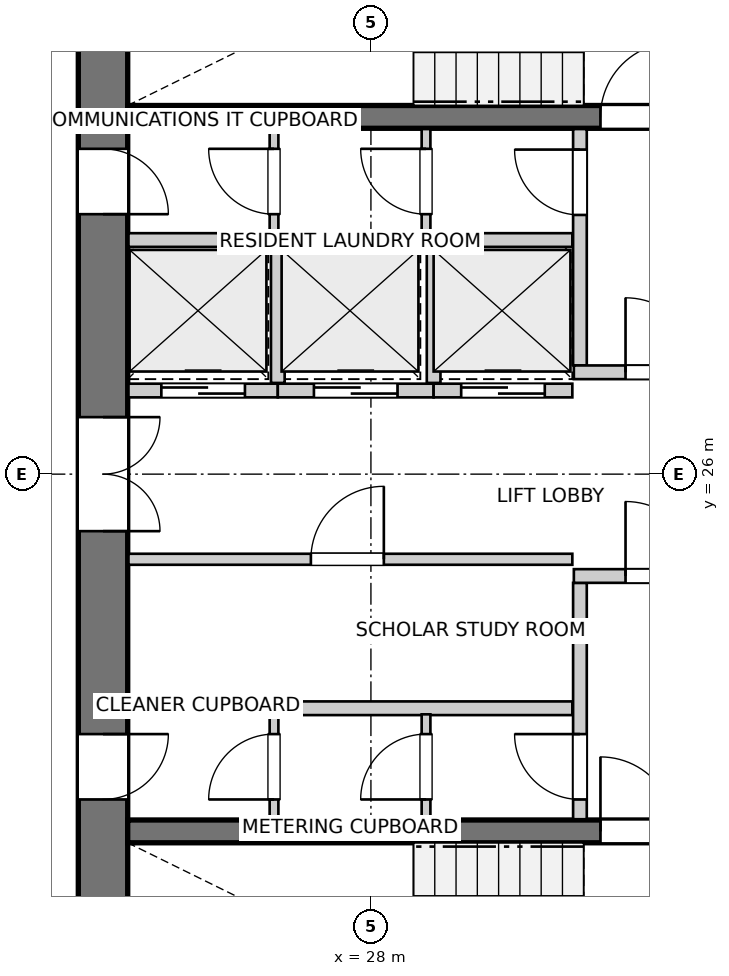
"""IFC4 building model, lengths in metres.
Left out: names, types, materials, properties, quantities, classifications, styles, units other than length and angle.
Written with IfcOpenShell. Run it as: python <this file> out.ifc"""

import sys

from ifc_helpers import new_model, si_unit, direction, frame, frame_2d, origin, place, context, subcontext, project, spatial, rectangle, extrude, source, transform, mapped, element, fill, save


model = new_model("IFC4")
c1 = context("Model", 3, precision=1e-05, world=origin(), true_north=direction((0.0, 1.0)))
c2 = subcontext(c1, "Body", "Model", "MODEL_VIEW")
j1 = project(units=[si_unit("LENGTHUNIT", "METRE"), si_unit("PLANEANGLEUNIT", "RADIAN")], contexts=[c1])
p1 = place(None, origin())
s1 = spatial("IfcSite", under=j1, at=p1, CompositionType="ELEMENT")
p2 = place(p1, origin())
s2 = spatial("IfcBuilding", under=s1, at=p2, CompositionType="ELEMENT")
p3 = place(p2, frame((0.0, 0.0, 158.6)))
s3 = spatial("IfcBuildingStorey", under=s2, at=p3, CompositionType="ELEMENT", Elevation=158.6)
p4 = place(p3, frame((24.475, 33.8, 0.0), z_axis=(0.0, 0.0, 1.0), x_axis=(0.0, -1.0, 0.0)))
e1 = element("IfcWall", 1, at=p4, inside=s3, PredefinedType="SHEAR", context=c2, shape_type="SweptSolid", body=[
    extrude(rectangle(XDim=15.6, YDim=0.65, at=frame_2d((7.8, 0.0))), origin(), (0.0, 0.0, 1.0), 2.95),
])
p5 = place(p4, frame((7.05, 0.0, 0.0)))
e2 = element("IfcOpeningElement", 2, at=p5, cuts=e1, PredefinedType="OPENING", context=c2, shape_type="SweptSolid", body=[
    extrude(rectangle(XDim=1.5, YDim=2.15, at=frame_2d((0.75, 1.075))), frame((0.0, 0.335, 0.0), z_axis=(0.0, -1.0, 0.0), x_axis=(1.0, 0.0, 0.0)), (0.0, 0.0, 1.0), 0.67),
])
p6 = place(p4, frame((3.52, 0.0, 0.0)))
e3 = element("IfcOpeningElement", 3, at=p6, cuts=e1, PredefinedType="OPENING", context=c2, shape_type="SweptSolid", body=[
    extrude(rectangle(XDim=0.86, YDim=2.05, at=frame_2d((0.43, 1.025))), frame((0.0, 0.335, 0.0), z_axis=(0.0, -1.0, 0.0), x_axis=(1.0, 0.0, 0.0)), (0.0, 0.0, 1.0), 0.67),
])
p7 = place(p4, frame((11.22, 0.0, 0.0)))
e4 = element("IfcOpeningElement", 4, at=p7, cuts=e1, PredefinedType="OPENING", context=c2, shape_type="SweptSolid", body=[
    extrude(rectangle(XDim=0.86, YDim=2.05, at=frame_2d((0.43, 1.025))), frame((0.0, 0.335, 0.0), z_axis=(0.0, -1.0, 0.0), x_axis=(1.0, 0.0, 0.0)), (0.0, 0.0, 1.0), 0.67),
])
p8 = place(p3, frame((24.8, 21.3, 0.0), z_axis=(0.0, 0.0, 1.0), x_axis=(1.0, 0.0, 0.0)))
e5 = element("IfcWall", 5, at=p8, inside=s3, PredefinedType="SHEAR", context=c2, shape_type="SweptSolid", body=[
    extrude(rectangle(XDim=11.1, YDim=0.3, at=frame_2d((5.55, 0.0))), origin(), (0.0, 0.0, 1.0), 2.95),
])
p9 = place(p8, frame((6.22, 0.0, 0.0)))
e6 = element("IfcOpeningElement", 6, at=p9, cuts=e5, PredefinedType="OPENING", context=c2, shape_type="SweptSolid", body=[
    extrude(rectangle(XDim=0.98, YDim=2.15, at=frame_2d((0.49, 1.075))), frame((0.0, 0.16, 0.0), z_axis=(0.0, -1.0, 0.0), x_axis=(1.0, 0.0, 0.0)), (0.0, 0.0, 1.0), 0.32),
])
p10 = place(p8, frame((9.15, 0.0, 0.0)))
e7 = element("IfcOpeningElement", 7, at=p10, cuts=e5, PredefinedType="OPENING", context=c2, shape_type="SweptSolid", body=[
    extrude(rectangle(XDim=1.15, YDim=2.15, at=frame_2d((0.575, 1.075))), frame((0.0, 0.16, 0.0), z_axis=(0.0, -1.0, 0.0), x_axis=(1.0, 0.0, 0.0)), (0.0, 0.0, 1.0), 0.32),
])
p11 = place(p3, frame((24.8, 30.7, 0.0), z_axis=(0.0, 0.0, 1.0), x_axis=(1.0, 0.0, 0.0)))
e8 = element("IfcWall", 8, at=p11, inside=s3, PredefinedType="SHEAR", context=c2, shape_type="SweptSolid", body=[
    extrude(rectangle(XDim=11.1, YDim=0.3, at=frame_2d((5.55, 0.0))), origin(), (0.0, 0.0, 1.0), 2.95),
])
p12 = place(p11, frame((6.22, 0.0, 0.0)))
e9 = element("IfcOpeningElement", 9, at=p12, cuts=e8, PredefinedType="OPENING", context=c2, shape_type="SweptSolid", body=[
    extrude(rectangle(XDim=0.98, YDim=2.15, at=frame_2d((0.49, 1.075))), frame((0.0, 0.16, 0.0), z_axis=(0.0, -1.0, 0.0), x_axis=(1.0, 0.0, 0.0)), (0.0, 0.0, 1.0), 0.32),
])
p13 = place(p11, frame((9.15, 0.0, 0.0)))
e10 = element("IfcOpeningElement", 10, at=p13, cuts=e8, PredefinedType="OPENING", context=c2, shape_type="SweptSolid", body=[
    extrude(rectangle(XDim=1.15, YDim=2.15, at=frame_2d((0.575, 1.075))), frame((0.0, 0.16, 0.0), z_axis=(0.0, -1.0, 0.0), x_axis=(1.0, 0.0, 0.0)), (0.0, 0.0, 1.0), 0.32),
])
p14 = place(p3, frame((30.75, 21.46, 0.0), z_axis=(0.0, 0.0, 1.0), x_axis=(0.0, 1.0, 0.0)))
e11 = element("IfcWall", 11, at=p14, inside=s3, PredefinedType="PARTITIONING", context=c2, shape_type="SweptSolid", body=[
    extrude(rectangle(XDim=3.11, YDim=0.18, at=frame_2d((1.555, 0.0))), origin(), (0.0, 0.0, 1.0), 2.95),
])
p15 = place(p14, frame((0.26, 0.0, 0.0)))
e12 = element("IfcOpeningElement", 12, at=p15, cuts=e11, PredefinedType="OPENING", context=c2, shape_type="SweptSolid", body=[
    extrude(rectangle(XDim=0.86, YDim=2.05, at=frame_2d((0.43, 1.025))), frame((0.0, 0.1, 0.0), z_axis=(0.0, -1.0, 0.0), x_axis=(1.0, 0.0, 0.0)), (0.0, 0.0, 1.0), 0.2),
])
p16 = place(p3, frame((30.67, 24.66, 0.0), z_axis=(0.0, 0.0, 1.0), x_axis=(1.0, 0.0, 0.0)))
e13 = element("IfcWall", 13, at=p16, inside=s3, PredefinedType="PARTITIONING", context=c2, shape_type="SweptSolid", body=[
    extrude(rectangle(XDim=5.22, YDim=0.18, at=frame_2d((2.61, 0.0))), origin(), (0.0, 0.0, 1.0), 2.95),
])
p17 = place(p16, frame((0.68, 0.0, 0.0)))
e14 = element("IfcOpeningElement", 14, at=p17, cuts=e13, PredefinedType="OPENING", context=c2, shape_type="SweptSolid", body=[
    extrude(rectangle(XDim=0.98, YDim=2.15, at=frame_2d((0.49, 1.075))), frame((0.0, 0.1, 0.0), z_axis=(0.0, -1.0, 0.0), x_axis=(1.0, 0.0, 0.0)), (0.0, 0.0, 1.0), 0.2),
])
p18 = place(p3, frame((30.75, 27.43, 0.0), z_axis=(0.0, 0.0, 1.0), x_axis=(0.0, 1.0, 0.0)))
e15 = element("IfcWall", 15, at=p18, inside=s3, PredefinedType="PARTITIONING", context=c2, shape_type="SweptSolid", body=[
    extrude(rectangle(XDim=3.11, YDim=0.18, at=frame_2d((1.555, 0.0))), origin(), (0.0, 0.0, 1.0), 2.95),
])
p19 = place(p18, frame((1.98, 0.0, 0.0)))
e16 = element("IfcOpeningElement", 16, at=p19, cuts=e15, PredefinedType="OPENING", context=c2, shape_type="SweptSolid", body=[
    extrude(rectangle(XDim=0.86, YDim=2.05, at=frame_2d((0.43, 1.025))), frame((0.0, 0.1, 0.0), z_axis=(0.0, -1.0, 0.0), x_axis=(1.0, 0.0, 0.0)), (0.0, 0.0, 1.0), 0.2),
])
p20 = place(p3, frame((30.67, 27.34, 0.0), z_axis=(0.0, 0.0, 1.0), x_axis=(1.0, 0.0, 0.0)))
e17 = element("IfcWall", 17, at=p20, inside=s3, PredefinedType="PARTITIONING", context=c2, shape_type="SweptSolid", body=[
    extrude(rectangle(XDim=5.22, YDim=0.18, at=frame_2d((2.61, 0.0))), origin(), (0.0, 0.0, 1.0), 2.95),
])
p21 = place(p20, frame((0.68, 0.0, 0.0)))
e18 = element("IfcOpeningElement", 18, at=p21, cuts=e17, PredefinedType="OPENING", context=c2, shape_type="SweptSolid", body=[
    extrude(rectangle(XDim=0.98, YDim=2.15, at=frame_2d((0.49, 1.075))), frame((0.0, 0.1, 0.0), z_axis=(0.0, -1.0, 0.0), x_axis=(1.0, 0.0, 0.0)), (0.0, 0.0, 1.0), 0.2),
])
p22 = place(p3, frame((24.81, 22.92, 0.0), z_axis=(0.0, 0.0, 1.0), x_axis=(1.0, 0.0, 0.0)))
e19 = element("IfcWall", 19, at=p22, inside=s3, PredefinedType="PARTITIONING", context=c2, shape_type="SweptSolid", body=[
    extrude(rectangle(XDim=5.84, YDim=0.18, at=frame_2d((2.92, 0.0))), origin(), (0.0, 0.0, 1.0), 2.95),
])
p23 = place(p3, frame((24.81, 24.88, 0.0), z_axis=(0.0, 0.0, 1.0), x_axis=(1.0, 0.0, 0.0)))
e20 = element("IfcWall", 20, at=p23, inside=s3, PredefinedType="PARTITIONING", context=c2, shape_type="SweptSolid", body=[
    extrude(rectangle(XDim=5.84, YDim=0.145, at=frame_2d((2.92, 0.0))), origin(), (0.0, 0.0, 1.0), 2.95),
])
p24 = place(p23, frame((2.4, 0.0, 0.0)))
e21 = element("IfcOpeningElement", 21, at=p24, cuts=e20, PredefinedType="OPENING", context=c2, shape_type="SweptSolid", body=[
    extrude(rectangle(XDim=0.96, YDim=2.1, at=frame_2d((0.48, 1.05))), frame((0.0, 0.083, 0.0), z_axis=(0.0, -1.0, 0.0), x_axis=(1.0, 0.0, 0.0)), (0.0, 0.0, 1.0), 0.165),
])
p25 = place(p3, frame((24.81, 29.08, 0.0), z_axis=(0.0, 0.0, 1.0), x_axis=(1.0, 0.0, 0.0)))
e22 = element("IfcWall", 22, at=p25, inside=s3, PredefinedType="PARTITIONING", context=c2, shape_type="SweptSolid", body=[
    extrude(rectangle(XDim=5.84, YDim=0.18, at=frame_2d((2.92, 0.0))), origin(), (0.0, 0.0, 1.0), 2.95),
])
p26 = place(p3, frame((24.81, 27.1, 0.0), z_axis=(0.0, 0.0, 1.0), x_axis=(1.0, 0.0, 0.0)))
e23 = element("IfcWall", 23, at=p26, inside=s3, PredefinedType="PARTITIONING", context=c2, shape_type="SweptSolid", body=[
    extrude(rectangle(XDim=1.965, YDim=0.18, at=frame_2d((0.982, 0.0))), origin(), (0.0, 0.0, 1.0), 2.95),
])
p27 = place(p26, frame((0.433, 0.0, 0.0)))
e24 = element("IfcOpeningElement", 24, at=p27, cuts=e23, PredefinedType="OPENING", context=c2, shape_type="SweptSolid", body=[
    extrude(rectangle(XDim=1.1, YDim=2.15, at=frame_2d((0.55, 1.075))), frame((0.0, 0.1, 0.0), z_axis=(0.0, -1.0, 0.0), x_axis=(1.0, 0.0, 0.0)), (0.0, 0.0, 1.0), 0.2),
])
p28 = place(p3, frame((26.775, 27.1, 0.0), z_axis=(0.0, 0.0, 1.0), x_axis=(1.0, 0.0, 0.0)))
e25 = element("IfcWall", 25, at=p28, inside=s3, PredefinedType="PARTITIONING", context=c2, shape_type="SweptSolid", body=[
    extrude(rectangle(XDim=2.05, YDim=0.18, at=frame_2d((1.025, 0.0))), origin(), (0.0, 0.0, 1.0), 2.95),
])
p29 = place(p28, frame((0.475, 0.0, 0.0)))
e26 = element("IfcOpeningElement", 26, at=p29, cuts=e25, PredefinedType="OPENING", context=c2, shape_type="SweptSolid", body=[
    extrude(rectangle(XDim=1.1, YDim=2.15, at=frame_2d((0.55, 1.075))), frame((0.0, 0.1, 0.0), z_axis=(0.0, -1.0, 0.0), x_axis=(1.0, 0.0, 0.0)), (0.0, 0.0, 1.0), 0.2),
])
p30 = place(p3, frame((26.775, 27.2, 0.0), z_axis=(0.0, 0.0, 1.0), x_axis=(0.0, 1.0, 0.0)))
e27 = element("IfcWall", 27, at=p30, inside=s3, PredefinedType="PARTITIONING", context=c2, shape_type="SweptSolid", body=[
    extrude(rectangle(XDim=1.78, YDim=0.18, at=frame_2d((0.89, 0.0))), origin(), (0.0, 0.0, 1.0), 2.95),
])
p31 = place(p3, frame((28.825, 27.1, 0.0), z_axis=(0.0, 0.0, 1.0), x_axis=(1.0, 0.0, 0.0)))
e28 = element("IfcWall", 28, at=p31, inside=s3, PredefinedType="PARTITIONING", context=c2, shape_type="SweptSolid", body=[
    extrude(rectangle(XDim=1.825, YDim=0.18, at=frame_2d((0.913, 0.0))), origin(), (0.0, 0.0, 1.0), 2.95),
])
p32 = place(p31, frame((0.363, 0.0, 0.0)))
e29 = element("IfcOpeningElement", 29, at=p32, cuts=e28, PredefinedType="OPENING", context=c2, shape_type="SweptSolid", body=[
    extrude(rectangle(XDim=1.1, YDim=2.15, at=frame_2d((0.55, 1.075))), frame((0.0, 0.1, 0.0), z_axis=(0.0, -1.0, 0.0), x_axis=(1.0, 0.0, 0.0)), (0.0, 0.0, 1.0), 0.2),
])
p33 = place(p3, frame((28.825, 27.2, 0.0), z_axis=(0.0, 0.0, 1.0), x_axis=(0.0, 1.0, 0.0)))
e30 = element("IfcWall", 30, at=p33, inside=s3, PredefinedType="PARTITIONING", context=c2, shape_type="SweptSolid", body=[
    extrude(rectangle(XDim=1.78, YDim=0.18, at=frame_2d((0.89, 0.0))), origin(), (0.0, 0.0, 1.0), 2.95),
])
p34 = place(p3, frame((26.725, 21.46, 0.0), z_axis=(0.0, 0.0, 1.0), x_axis=(0.0, 1.0, 0.0)))
e31 = element("IfcWall", 31, at=p34, inside=s3, PredefinedType="PARTITIONING", context=c2, shape_type="SweptSolid", body=[
    extrude(rectangle(XDim=1.38, YDim=0.115, at=frame_2d((0.69, 0.0))), origin(), (0.0, 0.0, 1.0), 2.95),
])
p35 = place(p34, frame((0.26, 0.0, 0.0)))
e32 = element("IfcOpeningElement", 32, at=p35, cuts=e31, PredefinedType="OPENING", context=c2, shape_type="SweptSolid", body=[
    extrude(rectangle(XDim=0.86, YDim=2.05, at=frame_2d((0.43, 1.025))), frame((0.0, 0.067, 0.0), z_axis=(0.0, -1.0, 0.0), x_axis=(1.0, 0.0, 0.0)), (0.0, 0.0, 1.0), 0.135),
])
p36 = place(p3, frame((26.725, 29.16, 0.0), z_axis=(0.0, 0.0, 1.0), x_axis=(0.0, 1.0, 0.0)))
e33 = element("IfcWall", 33, at=p36, inside=s3, PredefinedType="PARTITIONING", context=c2, shape_type="SweptSolid", body=[
    extrude(rectangle(XDim=1.38, YDim=0.115, at=frame_2d((0.69, 0.0))), origin(), (0.0, 0.0, 1.0), 2.95),
])
p37 = place(p36, frame((0.26, 0.0, 0.0)))
e34 = element("IfcOpeningElement", 34, at=p37, cuts=e33, PredefinedType="OPENING", context=c2, shape_type="SweptSolid", body=[
    extrude(rectangle(XDim=0.86, YDim=2.05, at=frame_2d((0.43, 1.025))), frame((0.0, 0.067, 0.0), z_axis=(0.0, -1.0, 0.0), x_axis=(1.0, 0.0, 0.0)), (0.0, 0.0, 1.0), 0.135),
])
p38 = place(p3, frame((28.725, 21.46, 0.0), z_axis=(0.0, 0.0, 1.0), x_axis=(0.0, 1.0, 0.0)))
e35 = element("IfcWall", 35, at=p38, inside=s3, PredefinedType="PARTITIONING", context=c2, shape_type="SweptSolid", body=[
    extrude(rectangle(XDim=1.38, YDim=0.115, at=frame_2d((0.69, 0.0))), origin(), (0.0, 0.0, 1.0), 2.95),
])
p39 = place(p38, frame((0.26, 0.0, 0.0)))
e36 = element("IfcOpeningElement", 36, at=p39, cuts=e35, PredefinedType="OPENING", context=c2, shape_type="SweptSolid", body=[
    extrude(rectangle(XDim=0.86, YDim=2.05, at=frame_2d((0.43, 1.025))), frame((0.0, 0.067, 0.0), z_axis=(0.0, -1.0, 0.0), x_axis=(1.0, 0.0, 0.0)), (0.0, 0.0, 1.0), 0.135),
])
p40 = place(p3, frame((28.725, 29.16, 0.0), z_axis=(0.0, 0.0, 1.0), x_axis=(0.0, 1.0, 0.0)))
e37 = element("IfcWall", 37, at=p40, inside=s3, PredefinedType="PARTITIONING", context=c2, shape_type="SweptSolid", body=[
    extrude(rectangle(XDim=1.38, YDim=0.115, at=frame_2d((0.69, 0.0))), origin(), (0.0, 0.0, 1.0), 2.95),
])
p41 = place(p40, frame((0.26, 0.0, 0.0)))
e38 = element("IfcOpeningElement", 38, at=p41, cuts=e37, PredefinedType="OPENING", context=c2, shape_type="SweptSolid", body=[
    extrude(rectangle(XDim=0.86, YDim=2.05, at=frame_2d((0.43, 1.025))), frame((0.0, 0.067, 0.0), z_axis=(0.0, -1.0, 0.0), x_axis=(1.0, 0.0, 0.0)), (0.0, 0.0, 1.0), 0.135),
])
m1 = source(origin(), c2, "Body", "SweptSolid", [
    extrude(rectangle(XDim=0.98, YDim=2.15, at=frame_2d((0.49, 1.075))), frame((0.0, 0.025, 0.0), z_axis=(0.0, -1.0, 0.0), x_axis=(1.0, 0.0, 0.0)), (0.0, 0.0, 1.0), 0.05),
])
p42 = place(p9, origin())
e39 = element("IfcDoor", 39, at=p42, inside=s3, OperationType="SINGLE_SWING_LEFT", PredefinedType="DOOR", context=c2, shape_type="MappedRepresentation", body=[
    mapped(m1, transform((0.0, 0.0, 0.0), x_axis=(1.0, 0.0, 0.0), y_axis=(0.0, 1.0, 0.0), z_axis=(0.0, 0.0, 1.0), scale=1.0)),
])
fill(e6, e39)
p43 = place(p12, origin())
e40 = element("IfcDoor", 40, at=p43, inside=s3, OperationType="SINGLE_SWING_RIGHT", PredefinedType="DOOR", context=c2, shape_type="MappedRepresentation", body=[
    mapped(m1, transform((0.0, 0.0, 0.0), x_axis=(1.0, 0.0, 0.0), y_axis=(0.0, 1.0, 0.0), z_axis=(0.0, 0.0, 1.0), scale=1.0)),
])
fill(e9, e40)
m2 = source(origin(), c2, "Body", "SweptSolid", [
    extrude(rectangle(XDim=1.5, YDim=2.15, at=frame_2d((0.75, 1.075))), frame((0.0, 0.025, 0.0), z_axis=(0.0, -1.0, 0.0), x_axis=(1.0, 0.0, 0.0)), (0.0, 0.0, 1.0), 0.05),
])
p44 = place(p5, origin())
e41 = element("IfcDoor", 41, at=p44, inside=s3, OperationType="DOUBLE_DOOR_SINGLE_SWING", PredefinedType="DOOR", context=c2, shape_type="MappedRepresentation", body=[
    mapped(m2, transform((0.0, 0.0, 0.0), x_axis=(1.0, 0.0, 0.0), y_axis=(0.0, 1.0, 0.0), z_axis=(0.0, 0.0, 1.0), scale=1.0)),
])
fill(e2, e41)
m3 = source(origin(), c2, "Body", "SweptSolid", [
    extrude(rectangle(XDim=0.86, YDim=2.05, at=frame_2d((0.43, 1.025))), frame((0.0, 0.025, 0.0), z_axis=(0.0, -1.0, 0.0), x_axis=(1.0, 0.0, 0.0)), (0.0, 0.0, 1.0), 0.05),
])
p45 = place(p6, origin())
e42 = element("IfcDoor", 42, at=p45, inside=s3, OperationType="SINGLE_SWING_RIGHT", PredefinedType="DOOR", context=c2, shape_type="MappedRepresentation", body=[
    mapped(m3, transform((0.0, 0.0, 0.0), x_axis=(1.0, 0.0, 0.0), y_axis=(0.0, 1.0, 0.0), z_axis=(0.0, 0.0, 1.0), scale=1.0)),
])
fill(e3, e42)
p46 = place(p7, origin())
e43 = element("IfcDoor", 43, at=p46, inside=s3, OperationType="SINGLE_SWING_LEFT", PredefinedType="DOOR", context=c2, shape_type="MappedRepresentation", body=[
    mapped(m3, transform((0.0, 0.0, 0.0), x_axis=(1.0, 0.0, 0.0), y_axis=(0.0, 1.0, 0.0), z_axis=(0.0, 0.0, 1.0), scale=1.0)),
])
fill(e4, e43)
p47 = place(p15, origin())
e44 = element("IfcDoor", 44, at=p47, inside=s3, OperationType="SINGLE_SWING_RIGHT", PredefinedType="DOOR", context=c2, shape_type="MappedRepresentation", body=[
    mapped(m3, transform((0.0, 0.0, 0.0), x_axis=(1.0, 0.0, 0.0), y_axis=(0.0, 1.0, 0.0), z_axis=(0.0, 0.0, 1.0), scale=1.0)),
])
fill(e12, e44)
p48 = place(p17, origin())
e45 = element("IfcDoor", 45, at=p48, inside=s3, OperationType="SINGLE_SWING_LEFT", PredefinedType="DOOR", context=c2, shape_type="MappedRepresentation", body=[
    mapped(m1, transform((0.0, 0.0, 0.0), x_axis=(1.0, 0.0, 0.0), y_axis=(0.0, 1.0, 0.0), z_axis=(0.0, 0.0, 1.0), scale=1.0)),
])
fill(e14, e45)
p49 = place(p19, origin())
e46 = element("IfcDoor", 46, at=p49, inside=s3, OperationType="SINGLE_SWING_RIGHT", PredefinedType="DOOR", context=c2, shape_type="MappedRepresentation", body=[
    mapped(m3, transform((0.0, 0.0, 0.0), x_axis=(1.0, 0.0, 0.0), y_axis=(0.0, 1.0, 0.0), z_axis=(0.0, 0.0, 1.0), scale=1.0)),
])
fill(e16, e46)
p50 = place(p21, origin())
e47 = element("IfcDoor", 47, at=p50, inside=s3, OperationType="SINGLE_SWING_LEFT", PredefinedType="DOOR", context=c2, shape_type="MappedRepresentation", body=[
    mapped(m1, transform((0.0, 0.0, 0.0), x_axis=(1.0, 0.0, 0.0), y_axis=(0.0, 1.0, 0.0), z_axis=(0.0, 0.0, 1.0), scale=1.0)),
])
fill(e18, e47)
m4 = source(origin(), c2, "Body", "SweptSolid", [
    extrude(rectangle(XDim=0.96, YDim=2.1, at=frame_2d((0.48, 1.05))), frame((0.0, 0.025, 0.0), z_axis=(0.0, -1.0, 0.0), x_axis=(1.0, 0.0, 0.0)), (0.0, 0.0, 1.0), 0.05),
])
p51 = place(p24, origin())
e48 = element("IfcDoor", 48, at=p51, inside=s3, OperationType="SINGLE_SWING_RIGHT", PredefinedType="DOOR", context=c2, shape_type="MappedRepresentation", body=[
    mapped(m4, transform((0.0, 0.0, 0.0), x_axis=(1.0, 0.0, 0.0), y_axis=(0.0, 1.0, 0.0), z_axis=(0.0, 0.0, 1.0), scale=1.0)),
])
fill(e21, e48)
m5 = source(origin(), c2, "Body", "SweptSolid", [
    extrude(rectangle(XDim=1.1, YDim=2.15, at=frame_2d((0.55, 1.075))), frame((0.0, 0.025, 0.0), z_axis=(0.0, -1.0, 0.0), x_axis=(1.0, 0.0, 0.0)), (0.0, 0.0, 1.0), 0.05),
])
p52 = place(p27, origin())
e49 = element("IfcDoor", 49, at=p52, inside=s3, OperationType="DOUBLE_DOOR_SLIDING", PredefinedType="DOOR", context=c2, shape_type="MappedRepresentation", body=[
    mapped(m5, transform((0.0, 0.0, 0.0), x_axis=(1.0, 0.0, 0.0), y_axis=(0.0, 1.0, 0.0), z_axis=(0.0, 0.0, 1.0), scale=1.0)),
])
fill(e24, e49)
p53 = place(p29, origin())
e50 = element("IfcDoor", 50, at=p53, inside=s3, OperationType="DOUBLE_DOOR_SLIDING", PredefinedType="DOOR", context=c2, shape_type="MappedRepresentation", body=[
    mapped(m5, transform((0.0, 0.0, 0.0), x_axis=(1.0, 0.0, 0.0), y_axis=(0.0, 1.0, 0.0), z_axis=(0.0, 0.0, 1.0), scale=1.0)),
])
fill(e26, e50)
p54 = place(p32, origin())
e51 = element("IfcDoor", 51, at=p54, inside=s3, OperationType="DOUBLE_DOOR_SLIDING", PredefinedType="DOOR", context=c2, shape_type="MappedRepresentation", body=[
    mapped(m5, transform((0.0, 0.0, 0.0), x_axis=(1.0, 0.0, 0.0), y_axis=(0.0, 1.0, 0.0), z_axis=(0.0, 0.0, 1.0), scale=1.0)),
])
fill(e29, e51)
p55 = place(p35, origin())
e52 = element("IfcDoor", 52, at=p55, inside=s3, OperationType="SINGLE_SWING_LEFT", PredefinedType="DOOR", context=c2, shape_type="MappedRepresentation", body=[
    mapped(m3, transform((0.0, 0.0, 0.0), x_axis=(1.0, 0.0, 0.0), y_axis=(0.0, 1.0, 0.0), z_axis=(0.0, 0.0, 1.0), scale=1.0)),
])
fill(e32, e52)
p56 = place(p37, origin())
e53 = element("IfcDoor", 53, at=p56, inside=s3, OperationType="SINGLE_SWING_RIGHT", PredefinedType="DOOR", context=c2, shape_type="MappedRepresentation", body=[
    mapped(m3, transform((0.0, 0.0, 0.0), x_axis=(1.0, 0.0, 0.0), y_axis=(0.0, 1.0, 0.0), z_axis=(0.0, 0.0, 1.0), scale=1.0)),
])
fill(e34, e53)
p57 = place(p39, origin())
e54 = element("IfcDoor", 54, at=p57, inside=s3, OperationType="SINGLE_SWING_LEFT", PredefinedType="DOOR", context=c2, shape_type="MappedRepresentation", body=[
    mapped(m3, transform((0.0, 0.0, 0.0), x_axis=(1.0, 0.0, 0.0), y_axis=(0.0, 1.0, 0.0), z_axis=(0.0, 0.0, 1.0), scale=1.0)),
])
fill(e36, e54)
p58 = place(p41, origin())
e55 = element("IfcDoor", 55, at=p58, inside=s3, OperationType="SINGLE_SWING_RIGHT", PredefinedType="DOOR", context=c2, shape_type="MappedRepresentation", body=[
    mapped(m3, transform((0.0, 0.0, 0.0), x_axis=(1.0, 0.0, 0.0), y_axis=(0.0, 1.0, 0.0), z_axis=(0.0, 0.0, 1.0), scale=1.0)),
])
fill(e38, e55)
save(model, sys.argv[1])
